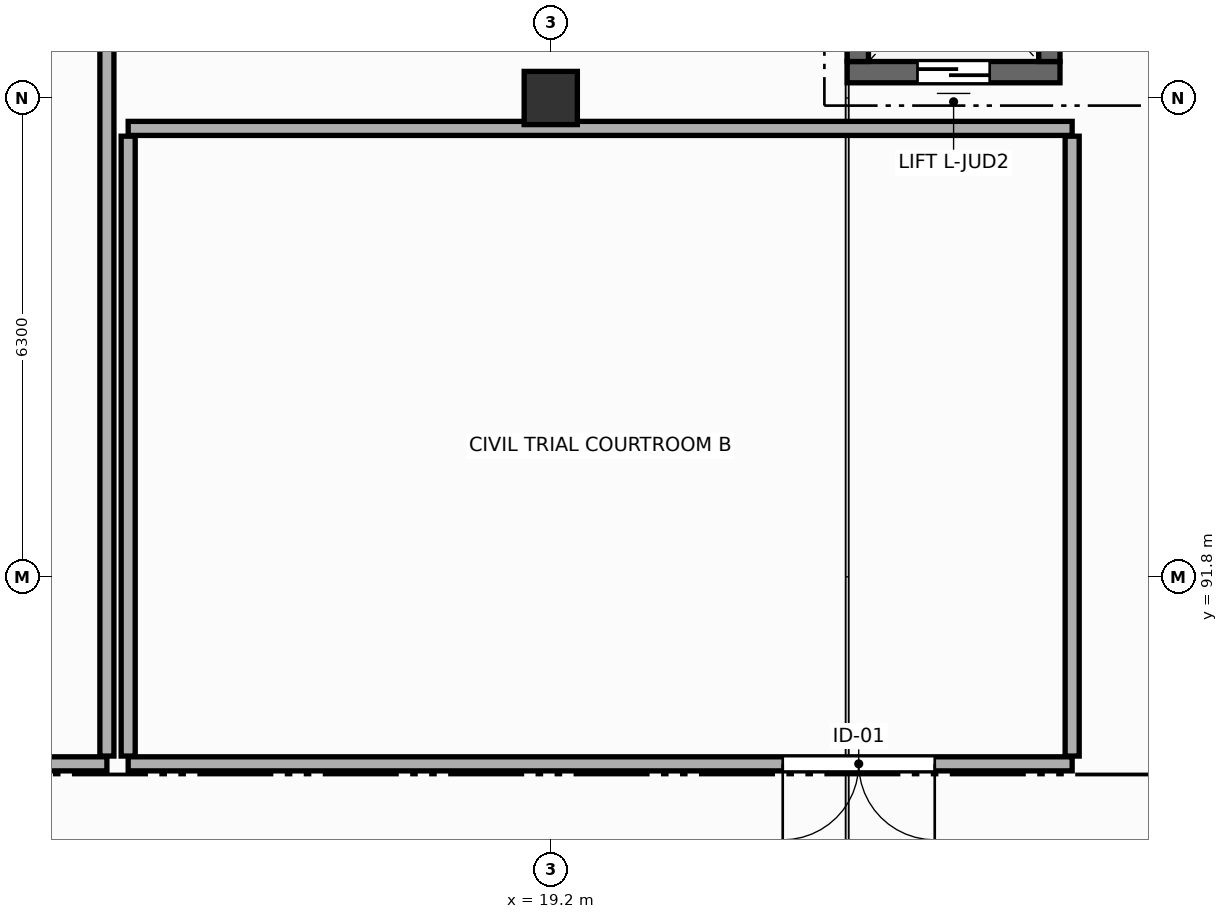
"""IFC4 building model, lengths in metres.
Left out: names, types, materials, properties, quantities, classifications, styles, units other than length and angle.
Written with IfcOpenShell. Run it as: python <this file> out.ifc"""

import sys

from ifc_helpers import new_model, si_unit, direction, frame, frame_2d, origin, origin_2d, place, context, subcontext, project, spatial, rectangle, extrude, element, fill, save


model = new_model("IFC4")
c1 = context("Model", 3, precision=1e-05, world=origin(), true_north=direction((0.0, 1.0)))
c2 = subcontext(c1, "Body", "Model", "MODEL_VIEW")
j1 = project(units=[si_unit("LENGTHUNIT", "METRE"), si_unit("PLANEANGLEUNIT", "RADIAN")], contexts=[c1])
p1 = place(None, origin())
s1 = spatial("IfcSite", under=j1, at=p1, CompositionType="ELEMENT")
p2 = place(p1, origin())
s2 = spatial("IfcBuilding", under=s1, at=p2, CompositionType="ELEMENT")
p3 = place(p2, frame((0.0, 0.0, 5.4)))
s3 = spatial("IfcBuildingStorey", under=s2, at=p3, CompositionType="ELEMENT", Elevation=5.4)
p4 = place(p3, frame((19.2, 98.1, 0.0), z_axis=(0.0, 0.0, 1.0), x_axis=(1.0, 0.0, 0.0)))
e1 = element("IfcColumn", 1, at=p4, inside=s3, PredefinedType="COLUMN", context=c2, shape_type="SweptSolid", body=[
    extrude(rectangle(XDim=0.7, YDim=0.7, at=origin_2d()), origin(), (0.0, 0.0, 1.0), 4.5),
])
p5 = place(p3, frame((25.9, 98.44, 0.0), z_axis=(0.0, 0.0, 1.0), x_axis=(-1.0, 0.0, 0.0)))
e2 = element("IfcWall", 2, at=p5, inside=s3, PredefinedType="SHEAR", context=c2, shape_type="SweptSolid", body=[
    extrude(rectangle(XDim=2.8, YDim=0.28, at=frame_2d((1.4, 0.0))), origin(), (0.0, 0.0, 1.0), 4.24),
])
p6 = place(p5, frame((0.925, 0.0, 0.0)))
e3 = element("IfcOpeningElement", 3, at=p6, cuts=e2, PredefinedType="OPENING", context=c2, shape_type="SweptSolid", body=[
    extrude(rectangle(XDim=0.95, YDim=2.15, at=frame_2d((0.475, 1.075))), frame((0.0, 0.15, 0.0), z_axis=(0.0, -1.0, 0.0), x_axis=(1.0, 0.0, 0.0)), (0.0, 0.0, 1.0), 0.3),
])
for number, where, z_axis, x_axis in (
    (4, (23.24, 98.58, 0.0), (0.0, 0.0, 1.0), (0.0, 1.0, 0.0)),
    (5, (25.76, 101.02, 0.0), (0.0, 0.0, 1.0), (0.0, -1.0, 0.0)),
):
    element("IfcWall", number, at=place(p3, frame(where, z_axis=z_axis, x_axis=x_axis)), inside=s3, PredefinedType="SHEAR", context=c2, shape_type="SweptSolid", body=[
        extrude(rectangle(XDim=2.44, YDim=0.28, at=frame_2d((1.22, 0.0))), origin(), (0.0, 0.0, 1.0), 4.24),
    ])
p7 = place(p3, frame((13.36, 89.34, 0.0), z_axis=(0.0, 0.0, 1.0), x_axis=(-1.0, 0.0, 0.0)))
e6 = element("IfcWall", 6, at=p7, inside=s3, PredefinedType="PARTITIONING", context=c2, shape_type="SweptSolid", body=[
    extrude(rectangle(XDim=12.886, YDim=0.185, at=frame_2d((6.443, 0.0))), origin(), (0.0, 0.0, 1.0), 3.33),
])
p8 = place(p7, frame((1.878, 0.0, 0.0)))
e7 = element("IfcOpeningElement", 7, at=p8, cuts=e6, PredefinedType="OPENING", context=c2, shape_type="SweptSolid", body=[
    extrude(rectangle(XDim=2.0, YDim=2.5, at=frame_2d((1.0, 1.25))), frame((0.0, 0.103, 0.0), z_axis=(0.0, -1.0, 0.0), x_axis=(1.0, 0.0, 0.0)), (0.0, 0.0, 1.0), 0.205),
])
p9 = place(p3, frame((13.36, 112.326, 0.0), z_axis=(0.0, 0.0, 1.0), x_axis=(0.0, -1.0, 0.0)))
e8 = element("IfcWall", 8, at=p9, inside=s3, PredefinedType="PARTITIONING", context=c2, shape_type="SweptSolid", body=[
    extrude(rectangle(XDim=22.884, YDim=0.185, at=frame_2d((11.442, 0.0))), origin(), (0.0, 0.0, 1.0), 3.43),
])
p10 = place(p3, frame((13.64, 97.7, 0.0), z_axis=(0.0, 0.0, 1.0), x_axis=(1.0, 0.0, 0.0)))
e9 = element("IfcWall", 9, at=p10, inside=s3, PredefinedType="PARTITIONING", context=c2, shape_type="SweptSolid", body=[
    extrude(rectangle(XDim=12.42, YDim=0.185, at=frame_2d((6.21, 0.0))), origin(), (0.0, 0.0, 1.0), 3.28),
])
p11 = place(p3, frame((26.06, 89.34, 0.0), z_axis=(0.0, 0.0, 1.0), x_axis=(-1.0, 0.0, 0.0)))
e10 = element("IfcWall", 10, at=p11, inside=s3, PredefinedType="PARTITIONING", context=c2, shape_type="SweptSolid", body=[
    extrude(rectangle(XDim=12.42, YDim=0.185, at=frame_2d((6.21, 0.0))), origin(), (0.0, 0.0, 1.0), 3.33),
])
p12 = place(p11, frame((1.808, 0.0, 0.0)))
e11 = element("IfcOpeningElement", 11, at=p12, cuts=e10, PredefinedType="OPENING", context=c2, shape_type="SweptSolid", body=[
    extrude(rectangle(XDim=2.0, YDim=2.5, at=frame_2d((1.0, 1.25))), frame((0.0, 0.103, 0.0), z_axis=(0.0, -1.0, 0.0), x_axis=(1.0, 0.0, 0.0)), (0.0, 0.0, 1.0), 0.205),
])
for number, where, z_axis, x_axis in (
    (12, (13.64, 89.442, 0.0), (0.0, 0.0, 1.0), (0.0, 1.0, 0.0)),
    (13, (26.06, 97.597, 0.0), (0.0, 0.0, 1.0), (0.0, -1.0, 0.0)),
):
    element("IfcWall", number, at=place(p3, frame(where, z_axis=z_axis, x_axis=x_axis)), inside=s3, PredefinedType="PARTITIONING", context=c2, shape_type="SweptSolid", body=[
        extrude(rectangle(XDim=8.155, YDim=0.185, at=frame_2d((4.078, 0.0))), origin(), (0.0, 0.0, 1.0), 3.58),
    ])
p13 = place(p6, origin())
e14 = element("IfcDoor", 14, at=p13, inside=s3, OperationType="DOUBLE_DOOR_SLIDING", PredefinedType="DOOR", context=c2, shape_type="SweptSolid", body=[
    extrude(rectangle(XDim=0.95, YDim=2.15, at=frame_2d((0.475, 1.075))), frame((0.0, 0.025, 0.0), z_axis=(0.0, -1.0, 0.0), x_axis=(1.0, 0.0, 0.0)), (0.0, 0.0, 1.0), 0.05),
])
fill(e3, e14)
p14 = place(p12, origin())
e15 = element("IfcDoor", 15, at=p14, inside=s3, OperationType="DOUBLE_DOOR_SINGLE_SWING", PredefinedType="DOOR", context=c2, shape_type="SweptSolid", body=[
    extrude(rectangle(XDim=2.0, YDim=2.5, at=frame_2d((1.0, 1.25))), frame((0.0, 0.025, 0.0), z_axis=(0.0, -1.0, 0.0), x_axis=(1.0, 0.0, 0.0)), (0.0, 0.0, 1.0), 0.05),
])
fill(e11, e15)
save(model, sys.argv[1])
